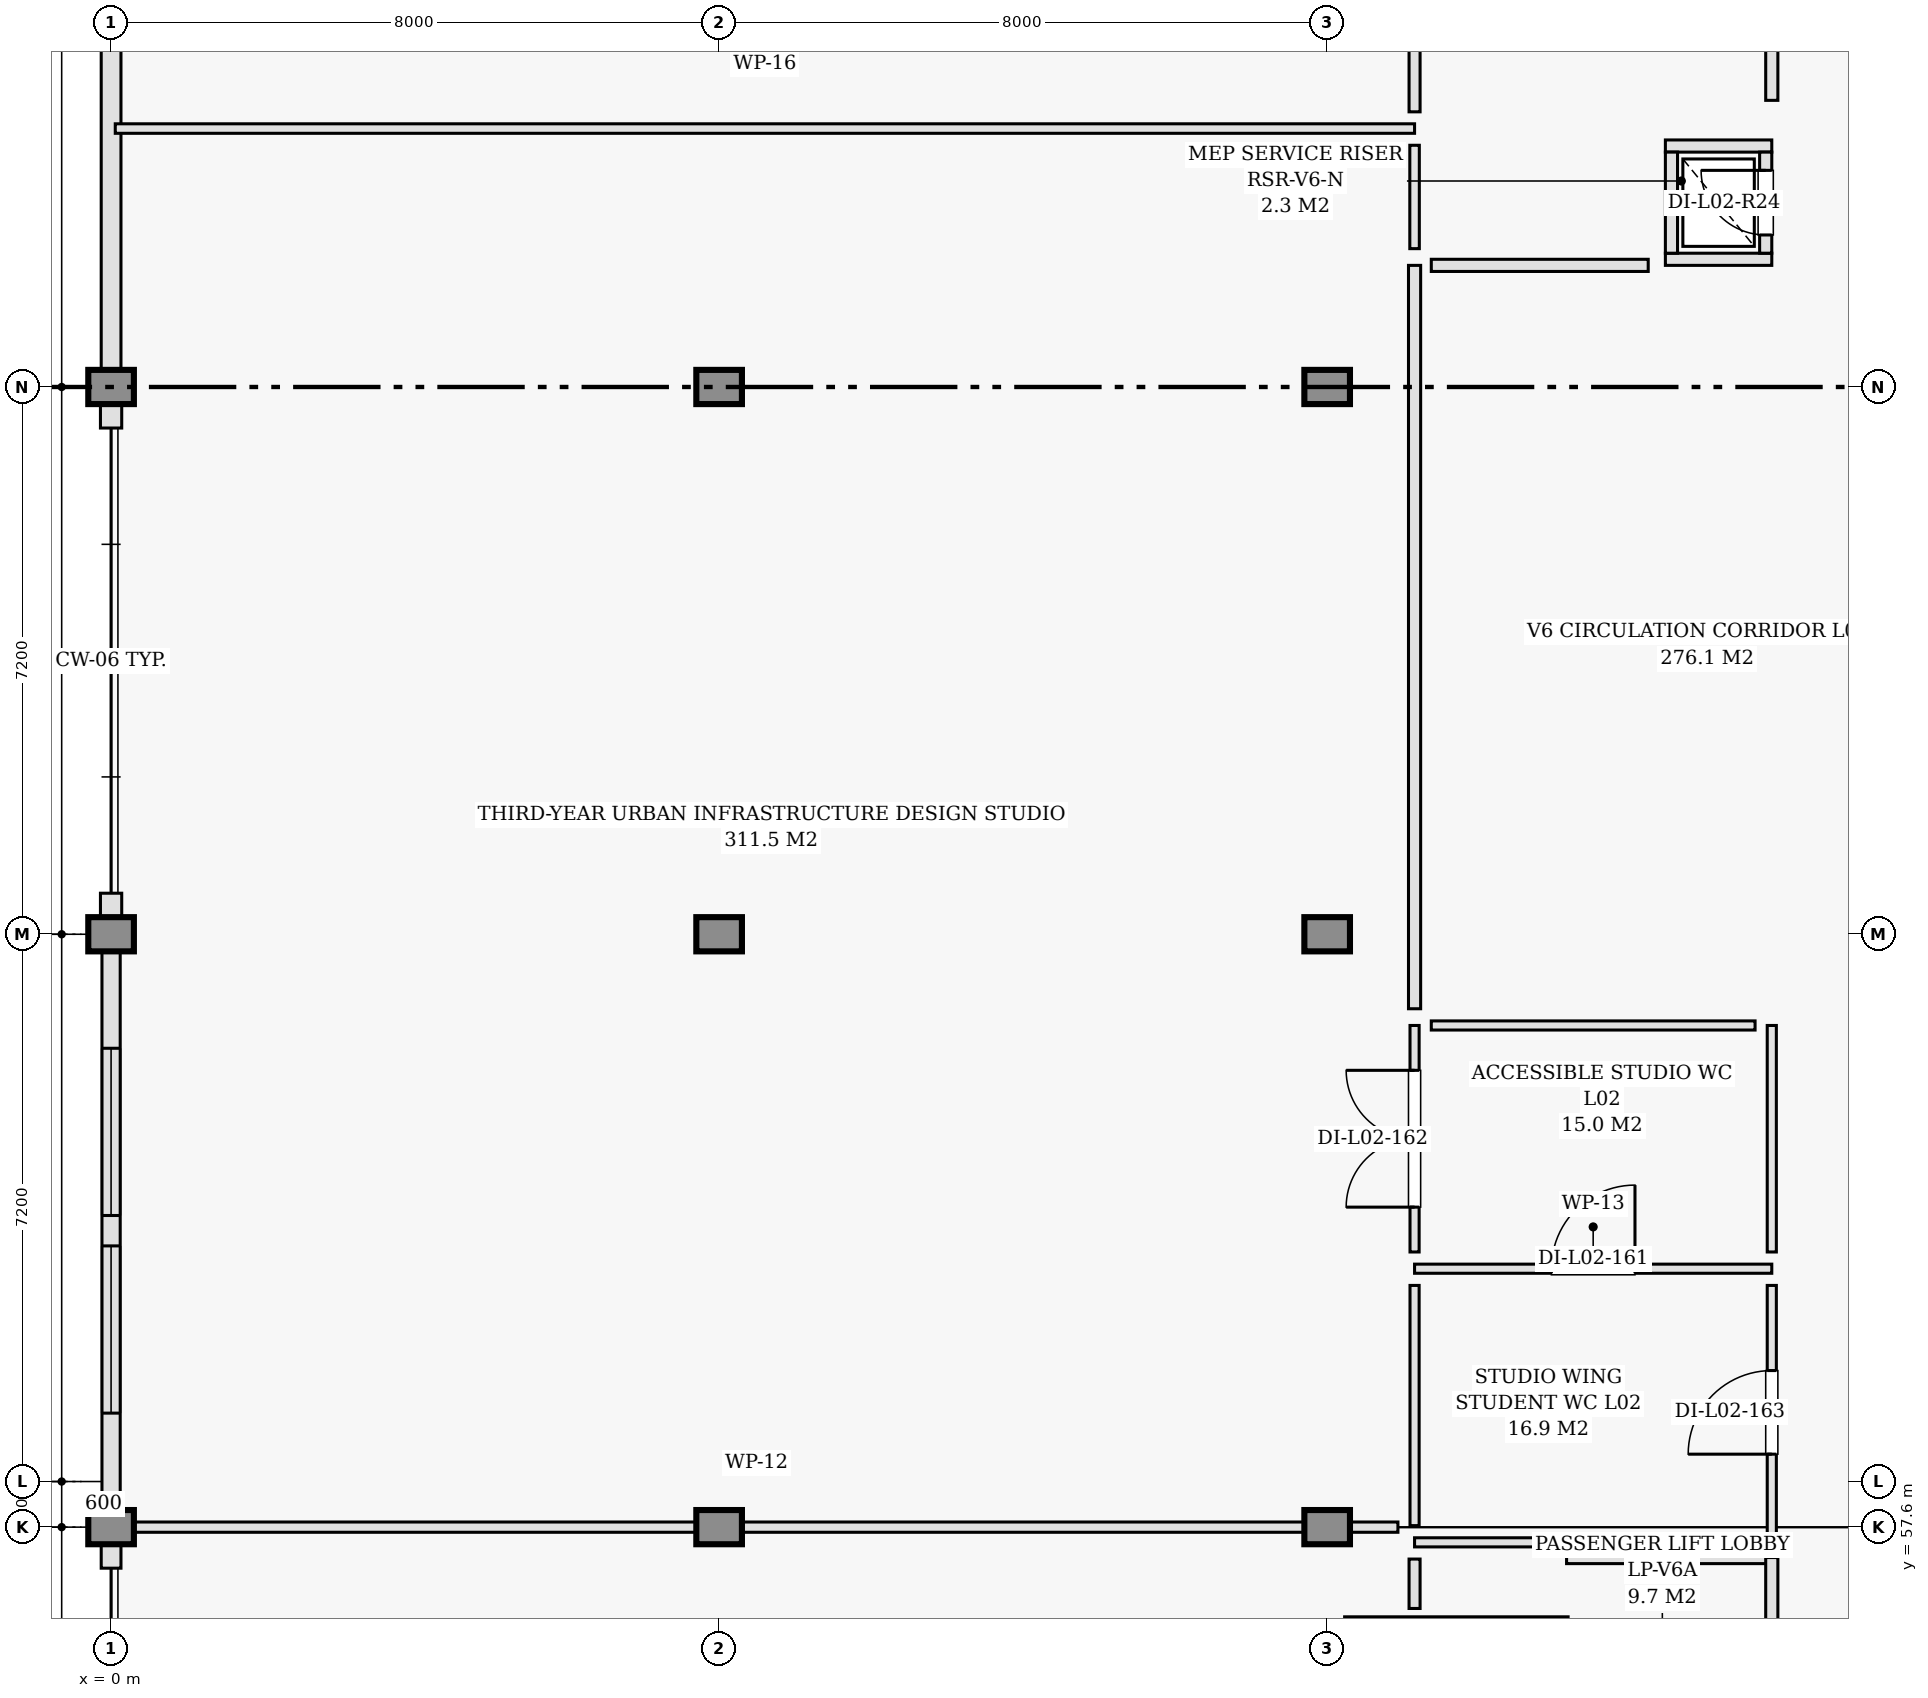
"""IFC4 building model, lengths in metres.
Left out: names, types, materials, properties, quantities, classifications, styles, units other than length and angle.
Written with IfcOpenShell. Run it as: python <this file> out.ifc"""

import sys

from ifc_helpers import new_model, si_unit, direction, frame, frame_2d, origin, origin_2d, place, context, subcontext, project, spatial, rectangle, extrude, element, fill, save


model = new_model("IFC4")
c1 = context("Model", 3, precision=1e-05, world=origin(), true_north=direction((0.0, 1.0)))
c2 = subcontext(c1, "Body", "Model", "MODEL_VIEW")
j1 = project(units=[si_unit("LENGTHUNIT", "METRE"), si_unit("PLANEANGLEUNIT", "RADIAN")], contexts=[c1])
p1 = place(None, origin())
s1 = spatial("IfcSite", under=j1, at=p1, CompositionType="ELEMENT")
p2 = place(p1, origin())
s2 = spatial("IfcBuilding", under=s1, at=p2, CompositionType="ELEMENT")
p3 = place(p2, frame((0.0, 0.0, 9.6)))
s3 = spatial("IfcBuildingStorey", under=s2, at=p3, CompositionType="ELEMENT", Elevation=9.6)
for number, where, z_axis, x_axis in (
    (1, (0.0, 57.6, 0.0), (0.0, 0.0, 1.0), (1.0, 0.0, 0.0)),
    (2, (0.0, 65.4, 0.0), (0.0, 0.0, 1.0), (1.0, 0.0, 0.0)),
    (3, (0.0, 72.6, 0.0), (0.0, 0.0, 1.0), (1.0, 0.0, 0.0)),
    (4, (8.0, 57.6, 0.0), (0.0, 0.0, 1.0), (1.0, 0.0, 0.0)),
    (5, (8.0, 65.4, 0.0), (0.0, 0.0, 1.0), (1.0, 0.0, 0.0)),
    (6, (8.0, 72.6, 0.0), (0.0, 0.0, 1.0), (1.0, 0.0, 0.0)),
    (7, (16.0, 57.6, 0.0), (0.0, 0.0, 1.0), (1.0, 0.0, 0.0)),
    (8, (16.0, 65.4, 0.0), (0.0, 0.0, 1.0), (1.0, 0.0, 0.0)),
    (9, (16.0, 72.6, 0.0), (0.0, 0.0, 1.0), (1.0, 0.0, 0.0)),
):
    element("IfcColumn", number, at=place(p3, frame(where, z_axis=z_axis, x_axis=x_axis)), inside=s3, PredefinedType="COLUMN", context=c2, shape_type="SweptSolid", body=[
        extrude(rectangle(XDim=0.45, YDim=0.45, at=origin_2d()), origin(), (0.0, 0.0, 1.0), 4.2),
    ])
p4 = place(p3, frame((0.0, 79.8, 0.0), z_axis=(0.0, 0.0, 1.0), x_axis=(0.0, -1.0, 0.0)))
e10 = element("IfcWall", 10, at=p4, inside=s3, PredefinedType="SOLIDWALL", context=c2, shape_type="SweptSolid", body=[
    extrude(rectangle(XDim=7.2, YDim=0.26, at=frame_2d((3.6, 0.0))), origin(), (0.0, 0.0, 1.0), 3.225),
])
for number, where, z_axis, x_axis in (
    (11, (0.0, 72.6, 0.0), (0.0, 0.0, 1.0), (0.0, -1.0, 0.0)),
    (12, (0.0, 65.94, 0.0), (0.0, 0.0, 1.0), (0.0, -1.0, 0.0)),
):
    element("IfcWall", number, at=place(p3, frame(where, z_axis=z_axis, x_axis=x_axis)), inside=s3, PredefinedType="SOLIDWALL", context=c2, shape_type="SweptSolid", body=[
        extrude(rectangle(XDim=0.54, YDim=0.28, at=frame_2d((0.27, 0.0))), origin(), (0.0, 0.0, 1.0), 3.225),
    ])
p5 = place(p3, frame((0.0, 65.4, 0.0), z_axis=(0.0, 0.0, 1.0), x_axis=(0.0, -1.0, 0.0)))
e13 = element("IfcWall", 13, at=p5, inside=s3, PredefinedType="SOLIDWALL", context=c2, shape_type="SweptSolid", body=[
    extrude(rectangle(XDim=7.8, YDim=0.24, at=frame_2d((3.9, 0.0))), origin(), (0.0, 0.0, 1.0), 3.225),
])
p6 = place(p5, frame((1.5, 0.0, 0.85)))
e14 = element("IfcOpeningElement", 14, at=p6, cuts=e13, PredefinedType="OPENING", context=c2, shape_type="SweptSolid", body=[
    extrude(rectangle(XDim=2.2, YDim=2.0, at=frame_2d((1.1, 1.0))), frame((0.0, 0.13, 0.0), z_axis=(0.0, -1.0, 0.0), x_axis=(1.0, 0.0, 0.0)), (0.0, 0.0, 1.0), 0.26),
])
p7 = place(p5, frame((4.1, 0.0, 0.85)))
e15 = element("IfcOpeningElement", 15, at=p7, cuts=e13, PredefinedType="OPENING", context=c2, shape_type="SweptSolid", body=[
    extrude(rectangle(XDim=2.2, YDim=2.0, at=frame_2d((1.1, 1.0))), frame((0.0, 0.13, 0.0), z_axis=(0.0, -1.0, 0.0), x_axis=(1.0, 0.0, 0.0)), (0.0, 0.0, 1.0), 0.26),
])
p8 = place(p3, frame((0.0, 57.6, 0.0), z_axis=(0.0, 0.0, 1.0), x_axis=(0.0, -1.0, 0.0)))
e16 = element("IfcWall", 16, at=p8, inside=s3, PredefinedType="SOLIDWALL", context=c2, shape_type="SweptSolid", body=[
    extrude(rectangle(XDim=0.54, YDim=0.26, at=frame_2d((0.27, 0.0))), origin(), (0.0, 0.0, 1.0), 3.225),
])
for number, where, z_axis, x_axis in (
    (17, (20.45, 74.28, 0.0), (0.0, 0.0, 1.0), (1.0, 0.0, 0.0)),
    (18, (20.45, 75.77, 0.0), (0.0, 0.0, 1.0), (1.0, 0.0, 0.0)),
):
    element("IfcWall", number, at=place(p3, frame(where, z_axis=z_axis, x_axis=x_axis)), inside=s3, PredefinedType="PARTITIONING", context=c2, shape_type="SweptSolid", body=[
        extrude(rectangle(XDim=1.4, YDim=0.16, at=frame_2d((0.7, 0.0))), origin(), (0.0, 0.0, 1.0), 3.94),
    ])
p9 = place(p3, frame((20.53, 74.36, 0.0), z_axis=(0.0, 0.0, 1.0), x_axis=(0.0, 1.0, 0.0)))
e19 = element("IfcWall", 19, at=p9, inside=s3, PredefinedType="PARTITIONING", context=c2, shape_type="SweptSolid", body=[
    extrude(rectangle(XDim=1.33, YDim=0.16, at=frame_2d((0.665, 0.0))), origin(), (0.0, 0.0, 1.0), 3.94),
])
p10 = place(p3, frame((21.77, 74.36, 0.0), z_axis=(0.0, 0.0, 1.0), x_axis=(0.0, 1.0, 0.0)))
e20 = element("IfcWall", 20, at=p10, inside=s3, PredefinedType="PARTITIONING", context=c2, shape_type="SweptSolid", body=[
    extrude(rectangle(XDim=1.33, YDim=0.16, at=frame_2d((0.665, 0.0))), origin(), (0.0, 0.0, 1.0), 3.94),
])
p11 = place(p10, frame((0.24, 0.0, 0.0)))
e21 = element("IfcOpeningElement", 21, at=p11, cuts=e20, PredefinedType="OPENING", context=c2, shape_type="SweptSolid", body=[
    extrude(rectangle(XDim=0.85, YDim=2.02, at=frame_2d((0.425, 1.01))), frame((0.0, 0.09, 0.0), z_axis=(0.0, -1.0, 0.0), x_axis=(1.0, 0.0, 0.0)), (0.0, 0.0, 1.0), 0.18),
])
p12 = place(p3, frame((16.25, 56.29, 0.0), z_axis=(0.0, 0.0, 1.0), x_axis=(1.0, 0.0, 0.0)))
e22 = element("IfcWall", 22, at=p12, inside=s3, PredefinedType="SHEAR", context=c2, shape_type="SweptSolid", body=[
    extrude(rectangle(XDim=2.9, YDim=0.22, at=frame_2d((1.45, 0.0))), origin(), (0.0, 0.0, 1.0), 3.94),
])
p13 = place(p3, frame((19.15, 57.2, 0.0), z_axis=(0.0, 0.0, 1.0), x_axis=(1.0, 0.0, 0.0)))
e23 = element("IfcWall", 23, at=p13, inside=s3, PredefinedType="PARTITIONING", context=c2, shape_type="SweptSolid", body=[
    extrude(rectangle(XDim=2.7, YDim=0.16, at=frame_2d((1.35, 0.0))), origin(), (0.0, 0.0, 1.0), 3.94),
])
p14 = place(p3, frame((21.85, 53.6, 0.0), z_axis=(0.0, 0.0, 1.0), x_axis=(0.0, 1.0, 0.0)))
e24 = element("IfcWall", 24, at=p14, inside=s3, PredefinedType="PARTITIONING", context=c2, shape_type="SweptSolid", body=[
    extrude(rectangle(XDim=3.6, YDim=0.16, at=frame_2d((1.8, 0.0))), origin(), (0.0, 0.0, 1.0), 3.94),
])
p15 = place(p14, frame((1.25, 0.0, 0.0)))
e25 = element("IfcOpeningElement", 25, at=p15, cuts=e24, PredefinedType="OPENING", context=c2, shape_type="SweptSolid", body=[
    extrude(rectangle(XDim=1.1, YDim=2.15, at=frame_2d((0.55, 1.075))), frame((0.0, 0.09, 0.0), z_axis=(0.0, -1.0, 0.0), x_axis=(1.0, 0.0, 0.0)), (0.0, 0.0, 1.0), 0.18),
])
p16 = place(p3, frame((17.15, 61.0, 0.0), z_axis=(0.0, 0.0, 1.0), x_axis=(1.0, 0.0, 0.0)))
e26 = element("IfcWall", 26, at=p16, inside=s3, PredefinedType="PARTITIONING", context=c2, shape_type="SweptSolid", body=[
    extrude(rectangle(XDim=4.7, YDim=0.12, at=frame_2d((2.35, 0.0))), origin(), (0.0, 0.0, 1.0), 3.94),
])
p17 = place(p16, frame((1.8, 0.0, 0.0)))
e27 = element("IfcOpeningElement", 27, at=p17, cuts=e26, PredefinedType="OPENING", context=c2, shape_type="SweptSolid", body=[
    extrude(rectangle(XDim=1.1, YDim=2.15, at=frame_2d((0.55, 1.075))), frame((0.0, 0.07, 0.0), z_axis=(0.0, -1.0, 0.0), x_axis=(1.0, 0.0, 0.0)), (0.0, 0.0, 1.0), 0.14),
])
p18 = place(p3, frame((21.85, 61.22, 0.0), z_axis=(0.0, 0.0, 1.0), x_axis=(0.0, 1.0, 0.0)))
e28 = element("IfcWall", 28, at=p18, inside=s3, PredefinedType="PARTITIONING", context=c2, shape_type="SweptSolid", body=[
    extrude(rectangle(XDim=2.98, YDim=0.12, at=frame_2d((1.49, 0.0))), origin(), (0.0, 0.0, 1.0), 3.485),
])
p19 = place(p3, frame((17.15, 61.22, 0.0), z_axis=(0.0, 0.0, 1.0), x_axis=(0.0, 1.0, 0.0)))
e29 = element("IfcWall", 29, at=p19, inside=s3, PredefinedType="PARTITIONING", context=c2, shape_type="SweptSolid", body=[
    extrude(rectangle(XDim=2.98, YDim=0.12, at=frame_2d((1.49, 0.0))), origin(), (0.0, 0.0, 1.0), 3.485),
])
p20 = place(p19, frame((0.59, 0.0, 0.0)))
e30 = element("IfcOpeningElement", 30, at=p20, cuts=e29, PredefinedType="OPENING", context=c2, shape_type="SweptSolid", body=[
    extrude(rectangle(XDim=1.8, YDim=2.2, at=frame_2d((0.9, 1.1))), frame((0.0, 0.07, 0.0), z_axis=(0.0, -1.0, 0.0), x_axis=(1.0, 0.0, 0.0)), (0.0, 0.0, 1.0), 0.14),
])
p21 = place(p3, frame((17.37, 64.2, 0.0), z_axis=(0.0, 0.0, 1.0), x_axis=(1.0, 0.0, 0.0)))
e31 = element("IfcWall", 31, at=p21, inside=s3, PredefinedType="PARTITIONING", context=c2, shape_type="SweptSolid", body=[
    extrude(rectangle(XDim=4.26, YDim=0.12, at=frame_2d((2.13, 0.0))), origin(), (0.0, 0.0, 1.0), 3.94),
])
p22 = place(p3, frame((21.85, 57.44, 0.0), z_axis=(0.0, 0.0, 1.0), x_axis=(0.0, 1.0, 0.0)))
e32 = element("IfcWall", 32, at=p22, inside=s3, PredefinedType="PARTITIONING", context=c2, shape_type="SweptSolid", body=[
    extrude(rectangle(XDim=3.34, YDim=0.12, at=frame_2d((1.67, 0.0))), origin(), (0.0, 0.0, 1.0), 3.225),
])
p23 = place(p22, frame((1.12, 0.0, 0.0)))
e33 = element("IfcOpeningElement", 33, at=p23, cuts=e32, PredefinedType="OPENING", context=c2, shape_type="SweptSolid", body=[
    extrude(rectangle(XDim=1.1, YDim=2.15, at=frame_2d((0.55, 1.075))), frame((0.0, 0.07, 0.0), z_axis=(0.0, -1.0, 0.0), x_axis=(1.0, 0.0, 0.0)), (0.0, 0.0, 1.0), 0.14),
])
p24 = place(p3, frame((17.15, 57.4, 0.0), z_axis=(0.0, 0.0, 1.0), x_axis=(1.0, 0.0, 0.0)))
e34 = element("IfcWall", 34, at=p24, inside=s3, PredefinedType="PARTITIONING", context=c2, shape_type="SweptSolid", body=[
    extrude(rectangle(XDim=1.867, YDim=0.12, at=frame_2d((0.934, 0.0))), origin(), (0.0, 0.0, 1.0), 3.225),
])
p25 = place(p3, frame((17.15, 57.62, 0.0), z_axis=(0.0, 0.0, 1.0), x_axis=(0.0, 1.0, 0.0)))
e35 = element("IfcWall", 35, at=p25, inside=s3, PredefinedType="PARTITIONING", context=c2, shape_type="SweptSolid", body=[
    extrude(rectangle(XDim=3.16, YDim=0.12, at=frame_2d((1.58, 0.0))), origin(), (0.0, 0.0, 1.0), 3.225),
])
p26 = place(p3, frame((17.15, 64.42, 0.0), z_axis=(0.0, 0.0, 1.0), x_axis=(0.0, 1.0, 0.0)))
e36 = element("IfcWall", 36, at=p26, inside=s3, PredefinedType="PARTITIONING", context=c2, shape_type="SweptSolid", body=[
    extrude(rectangle(XDim=9.78, YDim=0.16, at=frame_2d((4.89, 0.0))), origin(), (0.0, 0.0, 1.0), 3.225),
])
p27 = place(p3, frame((0.055, 76.0, 0.0), z_axis=(0.0, 0.0, 1.0), x_axis=(1.0, 0.0, 0.0)))
e37 = element("IfcWall", 37, at=p27, inside=s3, PredefinedType="PARTITIONING", context=c2, shape_type="SweptSolid", body=[
    extrude(rectangle(XDim=17.095, YDim=0.125, at=frame_2d((8.547, 0.0))), origin(), (0.0, 0.0, 1.0), 3.375),
])
p28 = place(p3, frame((17.15, 76.22, 0.0), z_axis=(0.0, 0.0, 1.0), x_axis=(0.0, 1.0, 0.0)))
e38 = element("IfcWall", 38, at=p28, inside=s3, PredefinedType="PARTITIONING", context=c2, shape_type="SweptSolid", body=[
    extrude(rectangle(XDim=3.99, YDim=0.145, at=frame_2d((1.995, 0.0))), origin(), (0.0, 0.0, 1.0), 3.225),
])
p29 = place(p3, frame((0.055, 57.6, 0.0), z_axis=(0.0, 0.0, 1.0), x_axis=(1.0, 0.0, 0.0)))
e39 = element("IfcWall", 39, at=p29, inside=s3, PredefinedType="PARTITIONING", context=c2, shape_type="SweptSolid", body=[
    extrude(rectangle(XDim=16.876, YDim=0.135, at=frame_2d((8.438, 0.0))), origin(), (0.0, 0.0, 1.0), 3.225),
])
p30 = place(p3, frame((17.15, 74.42, 0.0), z_axis=(0.0, 0.0, 1.0), x_axis=(0.0, 1.0, 0.0)))
e40 = element("IfcWall", 40, at=p30, inside=s3, PredefinedType="PARTITIONING", context=c2, shape_type="SweptSolid", body=[
    extrude(rectangle(XDim=1.36, YDim=0.125, at=frame_2d((0.68, 0.0))), origin(), (0.0, 0.0, 1.0), 3.94),
])
p31 = place(p3, frame((17.15, 56.53, 0.0), z_axis=(0.0, 0.0, 1.0), x_axis=(0.0, 1.0, 0.0)))
e41 = element("IfcWall", 41, at=p31, inside=s3, PredefinedType="PARTITIONING", context=c2, shape_type="SweptSolid", body=[
    extrude(rectangle(XDim=0.65, YDim=0.145, at=frame_2d((0.325, 0.0))), origin(), (0.0, 0.0, 1.0), 3.94),
])
p32 = place(p3, frame((17.37, 74.2, 0.0), z_axis=(0.0, 0.0, 1.0), x_axis=(1.0, 0.0, 0.0)))
e42 = element("IfcWall", 42, at=p32, inside=s3, PredefinedType="PARTITIONING", context=c2, shape_type="SweptSolid", body=[
    extrude(rectangle(XDim=2.854, YDim=0.16, at=frame_2d((1.427, 0.0))), origin(), (0.0, 0.0, 1.0), 3.94),
])
p33 = place(p3, frame((21.85, 76.371, 0.0), z_axis=(0.0, 0.0, 1.0), x_axis=(0.0, 1.0, 0.0)))
e43 = element("IfcWall", 43, at=p33, inside=s3, PredefinedType="PARTITIONING", context=c2, shape_type="SweptSolid", body=[
    extrude(rectangle(XDim=3.839, YDim=0.16, at=frame_2d((1.919, 0.0))), origin(), (0.0, 0.0, 1.0), 3.225),
])
p34 = place(p6, origin())
e44 = element("IfcWindow", 44, at=p34, inside=s3, PartitioningType="DOUBLE_PANEL_VERTICAL", PredefinedType="WINDOW", context=c2, shape_type="SweptSolid", body=[
    extrude(rectangle(XDim=2.2, YDim=2.0, at=frame_2d((1.1, 1.0))), frame((0.0, 0.03, 0.0), z_axis=(0.0, -1.0, 0.0), x_axis=(1.0, 0.0, 0.0)), (0.0, 0.0, 1.0), 0.06),
])
fill(e14, e44)
p35 = place(p7, origin())
e45 = element("IfcWindow", 45, at=p35, inside=s3, PartitioningType="DOUBLE_PANEL_VERTICAL", PredefinedType="WINDOW", context=c2, shape_type="SweptSolid", body=[
    extrude(rectangle(XDim=2.2, YDim=2.0, at=frame_2d((1.1, 1.0))), frame((0.0, 0.03, 0.0), z_axis=(0.0, -1.0, 0.0), x_axis=(1.0, 0.0, 0.0)), (0.0, 0.0, 1.0), 0.06),
])
fill(e15, e45)
p36 = place(p11, origin())
e46 = element("IfcDoor", 46, at=p36, inside=s3, OperationType="SINGLE_SWING_RIGHT", PredefinedType="DOOR", context=c2, shape_type="SweptSolid", body=[
    extrude(rectangle(XDim=0.85, YDim=2.02, at=frame_2d((0.425, 1.01))), frame((0.0, 0.025, 0.0), z_axis=(0.0, -1.0, 0.0), x_axis=(1.0, 0.0, 0.0)), (0.0, 0.0, 1.0), 0.05),
])
fill(e21, e46)
p37 = place(p17, origin())
e47 = element("IfcDoor", 47, at=p37, inside=s3, OperationType="SINGLE_SWING_RIGHT", PredefinedType="DOOR", context=c2, shape_type="SweptSolid", body=[
    extrude(rectangle(XDim=1.1, YDim=2.15, at=frame_2d((0.55, 1.075))), frame((0.0, 0.025, 0.0), z_axis=(0.0, -1.0, 0.0), x_axis=(1.0, 0.0, 0.0)), (0.0, 0.0, 1.0), 0.05),
])
fill(e27, e47)
p38 = place(p20, origin())
e48 = element("IfcDoor", 48, at=p38, inside=s3, OperationType="DOUBLE_DOOR_SINGLE_SWING", PredefinedType="DOOR", context=c2, shape_type="SweptSolid", body=[
    extrude(rectangle(XDim=1.8, YDim=2.2, at=frame_2d((0.9, 1.1))), frame((0.0, 0.025, 0.0), z_axis=(0.0, -1.0, 0.0), x_axis=(1.0, 0.0, 0.0)), (0.0, 0.0, 1.0), 0.05),
])
fill(e30, e48)
p39 = place(p23, origin())
e49 = element("IfcDoor", 49, at=p39, inside=s3, OperationType="SINGLE_SWING_LEFT", PredefinedType="DOOR", context=c2, shape_type="SweptSolid", body=[
    extrude(rectangle(XDim=1.1, YDim=2.15, at=frame_2d((0.55, 1.075))), frame((0.0, 0.025, 0.0), z_axis=(0.0, -1.0, 0.0), x_axis=(1.0, 0.0, 0.0)), (0.0, 0.0, 1.0), 0.05),
])
fill(e33, e49)
save(model, sys.argv[1])
